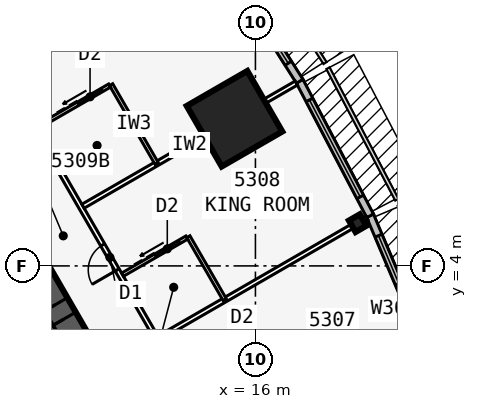
"""IFC4 building model, lengths in metres.
Left out: names, types, materials, properties, quantities, classifications, styles, units other than length and angle.
Written with IfcOpenShell. Run it as: python <this file> out.ifc"""

import sys

from ifc_helpers import new_model, si_unit, direction, frame, frame_2d, origin, origin_2d, place, context, subcontext, project, spatial, rectangle, i_section, extrude, element, fill, save


model = new_model("IFC4")
c1 = context("Model", 3, precision=1e-05, world=origin(), true_north=direction((0.0, 1.0)))
c2 = subcontext(c1, "Body", "Model", "MODEL_VIEW")
j1 = project(units=[si_unit("LENGTHUNIT", "METRE"), si_unit("PLANEANGLEUNIT", "RADIAN")], contexts=[c1])
p1 = place(None, origin())
s1 = spatial("IfcSite", under=j1, at=p1, CompositionType="ELEMENT")
p2 = place(p1, origin())
s2 = spatial("IfcBuilding", under=s1, at=p2, CompositionType="ELEMENT")
p3 = place(p2, frame((0.0, 0.0, 200.9)))
s3 = spatial("IfcBuildingStorey", under=s2, at=p3, CompositionType="ELEMENT", Elevation=200.9)
p4 = place(p3, frame((16.5, -9.526, 0.0), z_axis=(0.0, 0.0, 1.0), x_axis=(-0.499999749417, 0.866025548458, 0.0)))
e1 = element("IfcWall", 1, at=p4, inside=s3, PredefinedType="SHEAR", context=c2, shape_type="SweptSolid", body=[
    extrude(rectangle(XDim=33.0, YDim=0.9, at=frame_2d((16.5, 0.0))), origin(), (0.0, 0.0, 1.0), 3.6),
])
p5 = place(p4, frame((14.15, 0.0, 0.0)))
e2 = element("IfcOpeningElement", 2, at=p5, cuts=e1, PredefinedType="OPENING", context=c2, shape_type="SweptSolid", body=[
    extrude(rectangle(XDim=1.8, YDim=2.13, at=frame_2d((0.9, 1.065))), frame((0.0, 0.46, 0.0), z_axis=(0.0, -1.0, 0.0), x_axis=(1.0, 0.0, 0.0)), (0.0, 0.0, 1.0), 0.92),
])
p6 = place(p4, frame((12.6, 0.0, 0.0)))
e3 = element("IfcOpeningElement", 3, at=p6, cuts=e1, PredefinedType="OPENING", context=c2, shape_type="SweptSolid", body=[
    extrude(rectangle(XDim=1.0, YDim=2.13, at=frame_2d((0.5, 1.065))), frame((0.0, 0.46, 0.0), z_axis=(0.0, -1.0, 0.0), x_axis=(1.0, 0.0, 0.0)), (0.0, 0.0, 1.0), 0.92),
])
p7 = place(p3, frame((19.363, 5.406, 0.0), z_axis=(0.0, 0.0, 1.0), x_axis=(0.866025403784, 0.5, 0.0)))
e4 = element("IfcColumn", 4, at=p7, inside=s3, PredefinedType="COLUMN", context=c2, shape_type="SweptSolid", body=[
    extrude(i_section(OverallWidth=0.411, OverallDepth=0.434, WebThickness=0.036, FlangeThickness=0.057, at=origin_2d()), origin(), (0.0, 0.0, 1.0), 3.6),
])
p8 = place(p3, frame((15.312, 8.84, 0.0), z_axis=(0.0, 0.0, 1.0), x_axis=(0.866025403784, 0.5, 0.0)))
e5 = element("IfcColumn", 5, at=p8, inside=s3, PredefinedType="COLUMN", context=c2, shape_type="SweptSolid", body=[
    extrude(rectangle(XDim=2.3, YDim=2.3, at=origin_2d()), origin(), (0.0, 0.0, 1.0), 3.6),
])
p9 = place(p3, frame((21.733, 1.018, 0.0), z_axis=(0.0, 0.0, 1.0), x_axis=(-0.390096809471, 0.920773848044, 0.0)))
e6 = element("IfcWall", 6, at=p9, inside=s3, PredefinedType="STANDARD", context=c2, shape_type="SweptSolid", body=[
    extrude(rectangle(XDim=5.038, YDim=0.25, at=frame_2d((2.519, 0.0))), origin(), (0.0, 0.0, 1.0), 3.435),
])
p10 = place(p9, frame((0.719, 0.0, 0.45)))
e7 = element("IfcOpeningElement", 7, at=p10, cuts=e6, PredefinedType="OPENING", context=c2, shape_type="SweptSolid", body=[
    extrude(rectangle(XDim=3.6, YDim=2.6, at=frame_2d((1.8, 1.3))), frame((0.0, 0.135, 0.0), z_axis=(0.0, -1.0, 0.0), x_axis=(1.0, 0.0, 0.0)), (0.0, 0.0, 1.0), 0.27),
])
p11 = place(p3, frame((19.772, 5.648, 0.0), z_axis=(0.0, 0.0, 1.0), x_axis=(-0.463976002579, 0.885847768542, 0.0)))
e8 = element("IfcWall", 8, at=p11, inside=s3, PredefinedType="STANDARD", context=c2, shape_type="SweptSolid", body=[
    extrude(rectangle(XDim=5.004, YDim=0.25, at=frame_2d((2.502, 0.0))), origin(), (0.0, 0.0, 1.0), 3.435),
])
p12 = place(p11, frame((0.702, 0.0, 0.45)))
e9 = element("IfcOpeningElement", 9, at=p12, cuts=e8, PredefinedType="OPENING", context=c2, shape_type="SweptSolid", body=[
    extrude(rectangle(XDim=3.6, YDim=2.6, at=frame_2d((1.8, 1.3))), frame((0.0, 0.135, 0.0), z_axis=(0.0, -1.0, 0.0), x_axis=(1.0, 0.0, 0.0)), (0.0, 0.0, 1.0), 0.27),
])
p13 = place(p3, frame((17.456, 10.072, 0.0), z_axis=(0.0, 0.0, 1.0), x_axis=(-0.535220361449, 0.844712474568, 0.0)))
e10 = element("IfcWall", 10, at=p13, inside=s3, PredefinedType="STANDARD", context=c2, shape_type="SweptSolid", body=[
    extrude(rectangle(XDim=5.004, YDim=0.25, at=frame_2d((2.502, 0.0))), origin(), (0.0, 0.0, 1.0), 3.435),
])
p14 = place(p13, frame((0.702, 0.0, 0.45)))
e11 = element("IfcOpeningElement", 11, at=p14, cuts=e10, PredefinedType="OPENING", context=c2, shape_type="SweptSolid", body=[
    extrude(rectangle(XDim=3.6, YDim=2.6, at=frame_2d((1.8, 1.3))), frame((0.0, 0.135, 0.0), z_axis=(0.0, -1.0, 0.0), x_axis=(1.0, 0.0, 0.0)), (0.0, 0.0, 1.0), 0.27),
])
p15 = place(p3, frame((20.027, -10.985, 0.0), z_axis=(0.0, 0.0, 1.0), x_axis=(-0.500001677587, 0.866024435227, 0.0)))
e12 = element("IfcWall", 12, at=p15, inside=s3, PredefinedType="PARTITIONING", context=c2, shape_type="SweptSolid", body=[
    extrude(rectangle(XDim=39.054, YDim=0.15, at=frame_2d((19.527, 0.0))), origin(), (0.0, 0.0, 1.0), 3.435),
])
p16 = place(p15, frame((1.558, 0.0, 0.0)))
e13 = element("IfcOpeningElement", 13, at=p16, cuts=e12, PredefinedType="OPENING", context=c2, shape_type="SweptSolid", body=[
    extrude(rectangle(XDim=0.95, YDim=2.13, at=frame_2d((0.475, 1.065))), frame((0.0, 0.085, 0.0), z_axis=(0.0, -1.0, 0.0), x_axis=(1.0, 0.0, 0.0)), (0.0, 0.0, 1.0), 0.17),
])
p17 = place(p15, frame((12.752, 0.0, 0.0)))
e14 = element("IfcOpeningElement", 14, at=p17, cuts=e12, PredefinedType="OPENING", context=c2, shape_type="SweptSolid", body=[
    extrude(rectangle(XDim=0.95, YDim=2.13, at=frame_2d((0.475, 1.065))), frame((0.0, 0.085, 0.0), z_axis=(0.0, -1.0, 0.0), x_axis=(1.0, 0.0, 0.0)), (0.0, 0.0, 1.0), 0.17),
])
p18 = place(p15, frame((17.152, 0.0, 0.0)))
e15 = element("IfcOpeningElement", 15, at=p18, cuts=e12, PredefinedType="OPENING", context=c2, shape_type="SweptSolid", body=[
    extrude(rectangle(XDim=0.95, YDim=2.13, at=frame_2d((0.475, 1.065))), frame((0.0, 0.085, 0.0), z_axis=(0.0, -1.0, 0.0), x_axis=(1.0, 0.0, 0.0)), (0.0, 0.0, 1.0), 0.17),
])
p19 = place(p15, frame((22.752, 0.0, 0.0)))
e16 = element("IfcOpeningElement", 16, at=p19, cuts=e12, PredefinedType="OPENING", context=c2, shape_type="SweptSolid", body=[
    extrude(rectangle(XDim=0.95, YDim=2.13, at=frame_2d((0.475, 1.065))), frame((0.0, 0.085, 0.0), z_axis=(0.0, -1.0, 0.0), x_axis=(1.0, 0.0, 0.0)), (0.0, 0.0, 1.0), 0.17),
])
p20 = place(p15, frame((32.152, 0.0, 0.0)))
e17 = element("IfcOpeningElement", 17, at=p20, cuts=e12, PredefinedType="OPENING", context=c2, shape_type="SweptSolid", body=[
    extrude(rectangle(XDim=0.95, YDim=2.13, at=frame_2d((0.475, 1.065))), frame((0.0, 0.085, 0.0), z_axis=(0.0, -1.0, 0.0), x_axis=(1.0, 0.0, 0.0)), (0.0, 0.0, 1.0), 0.17),
])
p21 = place(p15, frame((37.152, 0.0, 0.0)))
e18 = element("IfcOpeningElement", 18, at=p21, cuts=e12, PredefinedType="OPENING", context=c2, shape_type="SweptSolid", body=[
    extrude(rectangle(XDim=0.95, YDim=2.13, at=frame_2d((0.475, 1.065))), frame((0.0, 0.085, 0.0), z_axis=(0.0, -1.0, 0.0), x_axis=(1.0, 0.0, 0.0)), (0.0, 0.0, 1.0), 0.17),
])
p22 = place(p3, frame((12.829, 1.633, 0.0), z_axis=(0.0, 0.0, 1.0), x_axis=(0.866030558329, 0.49999107196, 0.0)))
e19 = element("IfcWall", 19, at=p22, inside=s3, PredefinedType="PARTITIONING", context=c2, shape_type="SweptSolid", body=[
    extrude(rectangle(XDim=7.894, YDim=0.15, at=frame_2d((3.947, 0.0))), origin(), (0.0, 0.0, 1.0), 2.589),
])
p23 = place(p3, frame((10.329, 5.963, 0.0), z_axis=(0.0, 0.0, 1.0), x_axis=(0.866016460812, 0.500015489362, 0.0)))
e20 = element("IfcWall", 20, at=p23, inside=s3, PredefinedType="PARTITIONING", context=c2, shape_type="SweptSolid", body=[
    extrude(rectangle(XDim=8.101, YDim=0.15, at=frame_2d((4.051, 0.0))), origin(), (0.0, 0.0, 1.0), 2.589),
])
p24 = place(p3, frame((14.993, 2.883, 0.0), z_axis=(0.0, 0.0, 1.0), x_axis=(-0.500001309137, 0.866024647952, 0.0)))
e21 = element("IfcWall", 21, at=p24, inside=s3, PredefinedType="PLUMBINGWALL", context=c2, shape_type="SweptSolid", body=[
    extrude(rectangle(XDim=2.4, YDim=0.12, at=frame_2d((1.2, 0.0))), origin(), (0.0, 0.0, 1.0), 3.435),
])
p25 = place(p3, frame((11.628, 3.711, 0.0), z_axis=(0.0, 0.0, 1.0), x_axis=(0.866048967903, 0.499959183527, 0.0)))
e22 = element("IfcWall", 22, at=p25, inside=s3, PredefinedType="PLUMBINGWALL", context=c2, shape_type="SweptSolid", body=[
    extrude(rectangle(XDim=2.44, YDim=0.12, at=frame_2d((1.22, 0.0))), origin(), (0.0, 0.0, 1.0), 3.435),
])
p26 = place(p25, frame((1.25, 0.0, 0.0)))
e23 = element("IfcOpeningElement", 23, at=p26, cuts=e22, PredefinedType="OPENING", context=c2, shape_type="SweptSolid", body=[
    extrude(rectangle(XDim=0.9, YDim=2.13, at=frame_2d((0.45, 1.065))), frame((0.0, 0.07, 0.0), z_axis=(0.0, -1.0, 0.0), x_axis=(1.0, 0.0, 0.0)), (0.0, 0.0, 1.0), 0.14),
])
p27 = place(p3, frame((12.753, 7.363, 0.0), z_axis=(0.0, 0.0, 1.0), x_axis=(-0.499990139034, 0.866031096941, 0.0)))
e24 = element("IfcWall", 24, at=p27, inside=s3, PredefinedType="PLUMBINGWALL", context=c2, shape_type="SweptSolid", body=[
    extrude(rectangle(XDim=3.0, YDim=0.12, at=frame_2d((1.5, 0.0))), origin(), (0.0, 0.0, 1.0), 3.435),
])
p28 = place(p3, frame((8.829, 8.561, 0.0), z_axis=(0.0, 0.0, 1.0), x_axis=(0.866035715982, 0.499982138324, 0.0)))
e25 = element("IfcWall", 25, at=p28, inside=s3, PredefinedType="PLUMBINGWALL", context=c2, shape_type="SweptSolid", body=[
    extrude(rectangle(XDim=2.74, YDim=0.12, at=frame_2d((1.37, 0.0))), origin(), (0.0, 0.0, 1.0), 3.435),
])
p29 = place(p28, frame((1.55, 0.0, 0.0)))
e26 = element("IfcOpeningElement", 26, at=p29, cuts=e25, PredefinedType="OPENING", context=c2, shape_type="SweptSolid", body=[
    extrude(rectangle(XDim=0.9, YDim=2.13, at=frame_2d((0.45, 1.065))), frame((0.0, 0.07, 0.0), z_axis=(0.0, -1.0, 0.0), x_axis=(1.0, 0.0, 0.0)), (0.0, 0.0, 1.0), 0.14),
])
p30 = place(p10, origin())
e27 = element("IfcWindow", 27, at=p30, inside=s3, PartitioningType="SINGLE_PANEL", PredefinedType="WINDOW", context=c2, shape_type="SweptSolid", body=[
    extrude(rectangle(XDim=3.6, YDim=2.6, at=frame_2d((1.8, 1.3))), frame((0.0, 0.03, 0.0), z_axis=(0.0, -1.0, 0.0), x_axis=(1.0, 0.0, 0.0)), (0.0, 0.0, 1.0), 0.06),
])
fill(e7, e27)
p31 = place(p12, origin())
e28 = element("IfcWindow", 28, at=p31, inside=s3, PartitioningType="SINGLE_PANEL", PredefinedType="WINDOW", context=c2, shape_type="SweptSolid", body=[
    extrude(rectangle(XDim=3.6, YDim=2.6, at=frame_2d((1.8, 1.3))), frame((0.0, 0.03, 0.0), z_axis=(0.0, -1.0, 0.0), x_axis=(1.0, 0.0, 0.0)), (0.0, 0.0, 1.0), 0.06),
])
fill(e9, e28)
p32 = place(p14, origin())
e29 = element("IfcWindow", 29, at=p32, inside=s3, PartitioningType="SINGLE_PANEL", PredefinedType="WINDOW", context=c2, shape_type="SweptSolid", body=[
    extrude(rectangle(XDim=3.6, YDim=2.6, at=frame_2d((1.8, 1.3))), frame((0.0, 0.03, 0.0), z_axis=(0.0, -1.0, 0.0), x_axis=(1.0, 0.0, 0.0)), (0.0, 0.0, 1.0), 0.06),
])
fill(e11, e29)
p33 = place(p26, origin())
e30 = element("IfcDoor", 30, at=p33, inside=s3, OperationType="SLIDING_TO_LEFT", PredefinedType="DOOR", context=c2, shape_type="SweptSolid", body=[
    extrude(rectangle(XDim=0.9, YDim=2.13, at=frame_2d((0.45, 1.065))), frame((0.0, 0.025, 0.0), z_axis=(0.0, -1.0, 0.0), x_axis=(1.0, 0.0, 0.0)), (0.0, 0.0, 1.0), 0.05),
])
fill(e23, e30)
p34 = place(p18, origin())
e31 = element("IfcDoor", 31, at=p34, inside=s3, OperationType="SINGLE_SWING_LEFT", PredefinedType="DOOR", context=c2, shape_type="SweptSolid", body=[
    extrude(rectangle(XDim=0.95, YDim=2.13, at=frame_2d((0.475, 1.065))), frame((0.0, 0.025, 0.0), z_axis=(0.0, -1.0, 0.0), x_axis=(1.0, 0.0, 0.0)), (0.0, 0.0, 1.0), 0.05),
])
fill(e15, e31)
p35 = place(p29, origin())
e32 = element("IfcDoor", 32, at=p35, inside=s3, OperationType="SLIDING_TO_LEFT", PredefinedType="DOOR", context=c2, shape_type="SweptSolid", body=[
    extrude(rectangle(XDim=0.9, YDim=2.13, at=frame_2d((0.45, 1.065))), frame((0.0, 0.025, 0.0), z_axis=(0.0, -1.0, 0.0), x_axis=(1.0, 0.0, 0.0)), (0.0, 0.0, 1.0), 0.05),
])
fill(e26, e32)
p36 = place(p5, origin())
e33 = element("IfcDoor", 33, at=p36, inside=s3, OperationType="DOUBLE_DOOR_SINGLE_SWING", PredefinedType="DOOR", context=c2, shape_type="SweptSolid", body=[
    extrude(rectangle(XDim=1.8, YDim=2.13, at=frame_2d((0.9, 1.065))), frame((0.0, 0.025, 0.0), z_axis=(0.0, -1.0, 0.0), x_axis=(1.0, 0.0, 0.0)), (0.0, 0.0, 1.0), 0.05),
])
fill(e2, e33)
p37 = place(p6, origin())
e34 = element("IfcDoor", 34, at=p37, inside=s3, OperationType="SINGLE_SWING_RIGHT", PredefinedType="DOOR", context=c2, shape_type="SweptSolid", body=[
    extrude(rectangle(XDim=1.0, YDim=2.13, at=frame_2d((0.5, 1.065))), frame((0.0, 0.025, 0.0), z_axis=(0.0, -1.0, 0.0), x_axis=(1.0, 0.0, 0.0)), (0.0, 0.0, 1.0), 0.05),
])
fill(e3, e34)
save(model, sys.argv[1])
